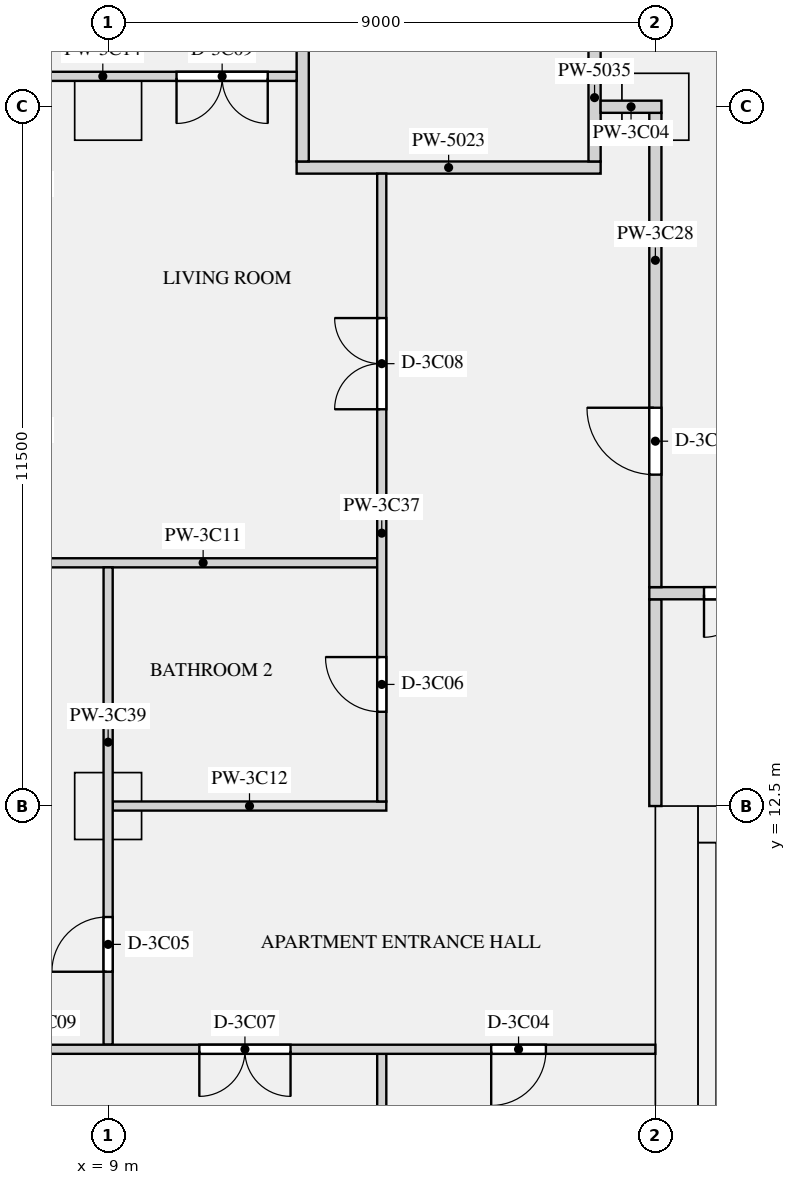
"""IFC4 building model, lengths in metres.
Left out: names, types, materials, properties, quantities, classifications, styles, units other than length and angle.
Written with IfcOpenShell. Run it as: python <this file> out.ifc"""

import sys

from ifc_helpers import new_model, si_unit, direction, frame, frame_2d, origin, origin_2d, place, context, subcontext, project, spatial, rectangle, extrude, element, fill, save


model = new_model("IFC4")
c1 = context("Model", 3, precision=1e-05, world=origin(), true_north=direction((0.0, 1.0)))
c2 = subcontext(c1, "Body", "Model", "MODEL_VIEW")
j1 = project(units=[si_unit("LENGTHUNIT", "METRE"), si_unit("PLANEANGLEUNIT", "RADIAN")], contexts=[c1])
p1 = place(None, origin())
s1 = spatial("IfcSite", under=j1, at=p1, CompositionType="ELEMENT")
p2 = place(p1, origin())
s2 = spatial("IfcBuilding", under=s1, at=p2, CompositionType="ELEMENT")
p3 = place(p2, frame((0.0, 0.0, 160.2)))
s3 = spatial("IfcBuildingStorey", under=s2, at=p3, CompositionType="ELEMENT", Elevation=160.2)
for number, where, z_axis, x_axis in (
    (1, (9.0, 24.0, 0.0), (0.0, 0.0, 1.0), (1.0, 0.0, 0.0)),
    (2, (18.0, 24.0, 0.0), (0.0, 0.0, 1.0), (1.0, 0.0, 0.0)),
    (3, (9.0, 12.5, 0.0), (0.0, 0.0, 1.0), (1.0, 0.0, 0.0)),
):
    element("IfcColumn", number, at=place(p3, frame(where, z_axis=z_axis, x_axis=x_axis)), inside=s3, PredefinedType="COLUMN", context=c2, shape_type="SweptSolid", body=[
        extrude(rectangle(XDim=1.1, YDim=1.1, at=origin_2d()), origin(), (0.0, 0.0, 1.0), 3.15),
    ])
p4 = place(p3, frame((18.35, 0.0, 0.0), z_axis=(0.0, 0.0, 1.0), x_axis=(0.0, 1.0, 0.0)))
e4 = element("IfcWall", 4, at=p4, inside=s3, PredefinedType="SHEAR", context=c2, shape_type="SweptSolid", body=[
    extrude(rectangle(XDim=12.5, YDim=0.7, at=frame_2d((6.25, 0.0))), origin(), (0.0, 0.0, 1.0), 3.15),
])
p5 = place(p3, frame((18.7, 12.2, 0.0), z_axis=(0.0, 0.0, 1.0), x_axis=(1.0, 0.0, 0.0)))
e5 = element("IfcWall", 5, at=p5, inside=s3, PredefinedType="SHEAR", context=c2, shape_type="SweptSolid", body=[
    extrude(rectangle(XDim=34.6, YDim=0.6, at=frame_2d((17.3, 0.0))), origin(), (0.0, 0.0, 1.0), 3.15),
])
p6 = place(p5, frame((24.475, 0.0, 0.0)))
e6 = element("IfcOpeningElement", 6, at=p6, cuts=e5, PredefinedType="OPENING", context=c2, shape_type="SweptSolid", body=[
    extrude(rectangle(XDim=1.1, YDim=2.1, at=frame_2d((0.55, 1.05))), frame((0.0, 0.31, 0.0), z_axis=(0.0, -1.0, 0.0), x_axis=(1.0, 0.0, 0.0)), (0.0, 0.0, 1.0), 0.62),
])
p7 = place(p5, frame((26.725, 0.0, 0.0)))
e7 = element("IfcOpeningElement", 7, at=p7, cuts=e5, PredefinedType="OPENING", context=c2, shape_type="SweptSolid", body=[
    extrude(rectangle(XDim=1.1, YDim=2.1, at=frame_2d((0.55, 1.05))), frame((0.0, 0.31, 0.0), z_axis=(0.0, -1.0, 0.0), x_axis=(1.0, 0.0, 0.0)), (0.0, 0.0, 1.0), 0.62),
])
p8 = place(p5, frame((28.975, 0.0, 0.0)))
e8 = element("IfcOpeningElement", 8, at=p8, cuts=e5, PredefinedType="OPENING", context=c2, shape_type="SweptSolid", body=[
    extrude(rectangle(XDim=1.1, YDim=2.1, at=frame_2d((0.55, 1.05))), frame((0.0, 0.31, 0.0), z_axis=(0.0, -1.0, 0.0), x_axis=(1.0, 0.0, 0.0)), (0.0, 0.0, 1.0), 0.62),
])
p9 = place(p5, frame((4.85, 0.0, 0.0)))
e9 = element("IfcOpeningElement", 9, at=p9, cuts=e5, PredefinedType="OPENING", context=c2, shape_type="SweptSolid", body=[
    extrude(rectangle(XDim=0.9, YDim=2.1, at=frame_2d((0.45, 1.05))), frame((0.0, 0.31, 0.0), z_axis=(0.0, -1.0, 0.0), x_axis=(1.0, 0.0, 0.0)), (0.0, 0.0, 1.0), 0.62),
])
p10 = place(p5, frame((13.85, 0.0, 0.0)))
e10 = element("IfcOpeningElement", 10, at=p10, cuts=e5, PredefinedType="OPENING", context=c2, shape_type="SweptSolid", body=[
    extrude(rectangle(XDim=0.9, YDim=2.1, at=frame_2d((0.45, 1.05))), frame((0.0, 0.31, 0.0), z_axis=(0.0, -1.0, 0.0), x_axis=(1.0, 0.0, 0.0)), (0.0, 0.0, 1.0), 0.62),
])
p11 = place(p5, frame((18.35, 0.0, 0.0)))
e11 = element("IfcOpeningElement", 11, at=p11, cuts=e5, PredefinedType="OPENING", context=c2, shape_type="SweptSolid", body=[
    extrude(rectangle(XDim=0.9, YDim=2.1, at=frame_2d((0.45, 1.05))), frame((0.0, 0.31, 0.0), z_axis=(0.0, -1.0, 0.0), x_axis=(1.0, 0.0, 0.0)), (0.0, 0.0, 1.0), 0.62),
])
p12 = place(p5, frame((1.45, 0.0, 0.0)))
e12 = element("IfcOpeningElement", 12, at=p12, cuts=e5, PredefinedType="OPENING", context=c2, shape_type="SweptSolid", body=[
    extrude(rectangle(XDim=1.2, YDim=2.1, at=frame_2d((0.6, 1.05))), frame((0.0, 0.31, 0.0), z_axis=(0.0, -1.0, 0.0), x_axis=(1.0, 0.0, 0.0)), (0.0, 0.0, 1.0), 0.62),
])
p13 = place(p5, frame((31.95, 0.0, 0.0)))
e13 = element("IfcOpeningElement", 13, at=p13, cuts=e5, PredefinedType="OPENING", context=c2, shape_type="SweptSolid", body=[
    extrude(rectangle(XDim=1.2, YDim=2.1, at=frame_2d((0.6, 1.05))), frame((0.0, 0.31, 0.0), z_axis=(0.0, -1.0, 0.0), x_axis=(1.0, 0.0, 0.0)), (0.0, 0.0, 1.0), 0.62),
])
p14 = place(p3, frame((18.85, 1.0, 0.0), z_axis=(0.0, 0.0, 1.0), x_axis=(0.0, 1.0, 0.0)))
e14 = element("IfcWall", 14, at=p14, inside=s3, PredefinedType="SHEAR", context=c2, shape_type="SweptSolid", body=[
    extrude(rectangle(XDim=10.9, YDim=0.3, at=frame_2d((5.45, 0.0))), origin(), (0.0, 0.0, 1.0), 3.15),
])
p15 = place(p3, frame((12.1, 23.0, 0.0), z_axis=(0.0, 0.0, 1.0), x_axis=(1.0, 0.0, 0.0)))
e15 = element("IfcWall", 15, at=p15, inside=s3, PredefinedType="PARTITIONING", context=c2, shape_type="SweptSolid", body=[
    extrude(rectangle(XDim=5.0, YDim=0.2, at=frame_2d((2.5, 0.0))), origin(), (0.0, 0.0, 1.0), 2.83),
])
p16 = place(p3, frame((18.0, 12.5, 0.0), z_axis=(0.0, 0.0, 1.0), x_axis=(0.0, 1.0, 0.0)))
e16 = element("IfcWall", 16, at=p16, inside=s3, PredefinedType="PARTITIONING", context=c2, shape_type="SweptSolid", body=[
    extrude(rectangle(XDim=3.4, YDim=0.2, at=frame_2d((1.7, 0.0))), origin(), (0.0, 0.0, 1.0), 2.83),
])
p17 = place(p3, frame((12.2, 23.1, 0.0), z_axis=(0.0, 0.0, 1.0), x_axis=(0.0, 1.0, 0.0)))
e17 = element("IfcWall", 17, at=p17, inside=s3, PredefinedType="PARTITIONING", context=c2, shape_type="SweptSolid", body=[
    extrude(rectangle(XDim=3.9, YDim=0.2, at=frame_2d((1.95, 0.0))), origin(), (0.0, 0.0, 1.0), 2.83),
])
p18 = place(p3, frame((17.0, 23.1, 0.0), z_axis=(0.0, 0.0, 1.0), x_axis=(0.0, 1.0, 0.0)))
e18 = element("IfcWall", 18, at=p18, inside=s3, PredefinedType="PARTITIONING", context=c2, shape_type="SweptSolid", body=[
    extrude(rectangle(XDim=3.8, YDim=0.2, at=frame_2d((1.9, 0.0))), origin(), (0.0, 0.0, 1.0), 2.83),
])
p19 = place(p18, frame((2.1, 0.0, 0.0)))
e19 = element("IfcOpeningElement", 19, at=p19, cuts=e18, PredefinedType="OPENING", context=c2, shape_type="SweptSolid", body=[
    extrude(rectangle(XDim=1.2, YDim=2.1, at=frame_2d((0.6, 1.05))), frame((0.0, 0.11, 0.0), z_axis=(0.0, -1.0, 0.0), x_axis=(1.0, 0.0, 0.0)), (0.0, 0.0, 1.0), 0.22),
])
p20 = place(p3, frame((17.1, 24.0, 0.0), z_axis=(0.0, 0.0, 1.0), x_axis=(1.0, 0.0, 0.0)))
e20 = element("IfcWall", 20, at=p20, inside=s3, PredefinedType="PARTITIONING", context=c2, shape_type="SweptSolid", body=[
    extrude(rectangle(XDim=1.0, YDim=0.2, at=frame_2d((0.5, 0.0))), origin(), (0.0, 0.0, 1.0), 2.83),
])
p21 = place(p3, frame((5.2, 8.5, 0.0), z_axis=(0.0, 0.0, 1.0), x_axis=(1.0, 0.0, 0.0)))
e21 = element("IfcWall", 21, at=p21, inside=s3, PredefinedType="PARTITIONING", context=c2, shape_type="SweptSolid", body=[
    extrude(rectangle(XDim=12.8, YDim=0.15, at=frame_2d((6.4, 0.0))), origin(), (0.0, 0.0, 1.0), 2.83),
])
p22 = place(p21, frame((10.1, 0.0, 0.0)))
e22 = element("IfcOpeningElement", 22, at=p22, cuts=e21, PredefinedType="OPENING", context=c2, shape_type="SweptSolid", body=[
    extrude(rectangle(XDim=0.9, YDim=2.1, at=frame_2d((0.45, 1.05))), frame((0.0, 0.085, 0.0), z_axis=(0.0, -1.0, 0.0), x_axis=(1.0, 0.0, 0.0)), (0.0, 0.0, 1.0), 0.17),
])
p23 = place(p21, frame((5.3, 0.0, 0.0)))
e23 = element("IfcOpeningElement", 23, at=p23, cuts=e21, PredefinedType="OPENING", context=c2, shape_type="SweptSolid", body=[
    extrude(rectangle(XDim=1.5, YDim=2.1, at=frame_2d((0.75, 1.05))), frame((0.0, 0.085, 0.0), z_axis=(0.0, -1.0, 0.0), x_axis=(1.0, 0.0, 0.0)), (0.0, 0.0, 1.0), 0.17),
])
p24 = place(p3, frame((7.7, 16.5, 0.0), z_axis=(0.0, 0.0, 1.0), x_axis=(1.0, 0.0, 0.0)))
e24 = element("IfcWall", 24, at=p24, inside=s3, PredefinedType="PARTITIONING", context=c2, shape_type="SweptSolid", body=[
    extrude(rectangle(XDim=5.725, YDim=0.15, at=frame_2d((2.863, 0.0))), origin(), (0.0, 0.0, 1.0), 2.83),
])
p25 = place(p3, frame((9.075, 12.5, 0.0), z_axis=(0.0, 0.0, 1.0), x_axis=(1.0, 0.0, 0.0)))
e25 = element("IfcWall", 25, at=p25, inside=s3, PredefinedType="PARTITIONING", context=c2, shape_type="SweptSolid", body=[
    extrude(rectangle(XDim=4.5, YDim=0.15, at=frame_2d((2.25, 0.0))), origin(), (0.0, 0.0, 1.0), 2.83),
])
p26 = place(p3, frame((7.7, 24.5, 0.0), z_axis=(0.0, 0.0, 1.0), x_axis=(1.0, 0.0, 0.0)))
e26 = element("IfcWall", 26, at=p26, inside=s3, PredefinedType="PARTITIONING", context=c2, shape_type="SweptSolid", body=[
    extrude(rectangle(XDim=4.4, YDim=0.15, at=frame_2d((2.2, 0.0))), origin(), (0.0, 0.0, 1.0), 2.83),
])
p27 = place(p26, frame((2.425, 0.0, 0.0)))
e27 = element("IfcOpeningElement", 27, at=p27, cuts=e26, PredefinedType="OPENING", context=c2, shape_type="SweptSolid", body=[
    extrude(rectangle(XDim=1.5, YDim=2.1, at=frame_2d((0.75, 1.05))), frame((0.0, 0.085, 0.0), z_axis=(0.0, -1.0, 0.0), x_axis=(1.0, 0.0, 0.0)), (0.0, 0.0, 1.0), 0.17),
])
p28 = place(p3, frame((17.9, 16.0, 0.0), z_axis=(0.0, 0.0, 1.0), x_axis=(1.0, 0.0, 0.0)))
e28 = element("IfcWall", 28, at=p28, inside=s3, PredefinedType="PARTITIONING", context=c2, shape_type="SweptSolid", body=[
    extrude(rectangle(XDim=36.2, YDim=0.2, at=frame_2d((18.1, 0.0))), origin(), (0.0, 0.0, 1.0), 2.83),
])
p29 = place(p28, frame((0.9, 0.0, 0.0)))
e29 = element("IfcOpeningElement", 29, at=p29, cuts=e28, PredefinedType="OPENING", context=c2, shape_type="SweptSolid", body=[
    extrude(rectangle(XDim=1.4, YDim=2.1, at=frame_2d((0.7, 1.05))), frame((0.0, 0.11, 0.0), z_axis=(0.0, -1.0, 0.0), x_axis=(1.0, 0.0, 0.0)), (0.0, 0.0, 1.0), 0.22),
])
p30 = place(p28, frame((33.9, 0.0, 0.0)))
e30 = element("IfcOpeningElement", 30, at=p30, cuts=e28, PredefinedType="OPENING", context=c2, shape_type="SweptSolid", body=[
    extrude(rectangle(XDim=1.4, YDim=2.1, at=frame_2d((0.7, 1.05))), frame((0.0, 0.11, 0.0), z_axis=(0.0, -1.0, 0.0), x_axis=(1.0, 0.0, 0.0)), (0.0, 0.0, 1.0), 0.22),
])
p31 = place(p3, frame((18.0, 16.1, 0.0), z_axis=(0.0, 0.0, 1.0), x_axis=(0.0, 1.0, 0.0)))
e31 = element("IfcWall", 31, at=p31, inside=s3, PredefinedType="PARTITIONING", context=c2, shape_type="SweptSolid", body=[
    extrude(rectangle(XDim=7.8, YDim=0.2, at=frame_2d((3.9, 0.0))), origin(), (0.0, 0.0, 1.0), 2.83),
])
p32 = place(p31, frame((1.85, 0.0, 0.0)))
e32 = element("IfcOpeningElement", 32, at=p32, cuts=e31, PredefinedType="OPENING", context=c2, shape_type="SweptSolid", body=[
    extrude(rectangle(XDim=1.1, YDim=2.1, at=frame_2d((0.55, 1.05))), frame((0.0, 0.11, 0.0), z_axis=(0.0, -1.0, 0.0), x_axis=(1.0, 0.0, 0.0)), (0.0, 0.0, 1.0), 0.22),
])
p33 = place(p3, frame((13.5, 0.7, 0.0), z_axis=(0.0, 0.0, 1.0), x_axis=(0.0, 1.0, 0.0)))
e33 = element("IfcWall", 33, at=p33, inside=s3, PredefinedType="PARTITIONING", context=c2, shape_type="SweptSolid", body=[
    extrude(rectangle(XDim=7.725, YDim=0.15, at=frame_2d((3.863, 0.0))), origin(), (0.0, 0.0, 1.0), 2.83),
])
p34 = place(p3, frame((13.5, 12.575, 0.0), z_axis=(0.0, 0.0, 1.0), x_axis=(0.0, 1.0, 0.0)))
e34 = element("IfcWall", 34, at=p34, inside=s3, PredefinedType="PARTITIONING", context=c2, shape_type="SweptSolid", body=[
    extrude(rectangle(XDim=10.325, YDim=0.15, at=frame_2d((5.163, 0.0))), origin(), (0.0, 0.0, 1.0), 2.83),
])
p35 = place(p34, frame((1.475, 0.0, 0.0)))
e35 = element("IfcOpeningElement", 35, at=p35, cuts=e34, PredefinedType="OPENING", context=c2, shape_type="SweptSolid", body=[
    extrude(rectangle(XDim=0.9, YDim=2.1, at=frame_2d((0.45, 1.05))), frame((0.0, 0.085, 0.0), z_axis=(0.0, -1.0, 0.0), x_axis=(1.0, 0.0, 0.0)), (0.0, 0.0, 1.0), 0.17),
])
p36 = place(p34, frame((6.45, 0.0, 0.0)))
e36 = element("IfcOpeningElement", 36, at=p36, cuts=e34, PredefinedType="OPENING", context=c2, shape_type="SweptSolid", body=[
    extrude(rectangle(XDim=1.5, YDim=2.1, at=frame_2d((0.75, 1.05))), frame((0.0, 0.085, 0.0), z_axis=(0.0, -1.0, 0.0), x_axis=(1.0, 0.0, 0.0)), (0.0, 0.0, 1.0), 0.17),
])
p37 = place(p3, frame((9.0, 8.575, 0.0), z_axis=(0.0, 0.0, 1.0), x_axis=(0.0, 1.0, 0.0)))
e37 = element("IfcWall", 37, at=p37, inside=s3, PredefinedType="PARTITIONING", context=c2, shape_type="SweptSolid", body=[
    extrude(rectangle(XDim=7.85, YDim=0.15, at=frame_2d((3.925, 0.0))), origin(), (0.0, 0.0, 1.0), 2.83),
])
p38 = place(p37, frame((1.2, 0.0, 0.0)))
e38 = element("IfcOpeningElement", 38, at=p38, cuts=e37, PredefinedType="OPENING", context=c2, shape_type="SweptSolid", body=[
    extrude(rectangle(XDim=0.9, YDim=2.1, at=frame_2d((0.45, 1.05))), frame((0.0, 0.085, 0.0), z_axis=(0.0, -1.0, 0.0), x_axis=(1.0, 0.0, 0.0)), (0.0, 0.0, 1.0), 0.17),
])
p39 = place(p29, frame((1.4, 0.0, 0.0), z_axis=(0.0, 0.0, 1.0), x_axis=(-1.0, 0.0, 0.0)))
e39 = element("IfcDoor", 39, at=p39, inside=s3, OperationType="DOUBLE_DOOR_SINGLE_SWING", PredefinedType="DOOR", context=c2, shape_type="SweptSolid", body=[
    extrude(rectangle(XDim=1.4, YDim=2.1, at=frame_2d((0.7, 1.05))), frame((0.0, 0.025, 0.0), z_axis=(0.0, -1.0, 0.0), x_axis=(1.0, 0.0, 0.0)), (0.0, 0.0, 1.0), 0.05),
])
fill(e29, e39)
p40 = place(p32, origin())
e40 = element("IfcDoor", 40, at=p40, inside=s3, OperationType="SINGLE_SWING_RIGHT", PredefinedType="DOOR", context=c2, shape_type="SweptSolid", body=[
    extrude(rectangle(XDim=1.1, YDim=2.1, at=frame_2d((0.55, 1.05))), frame((0.0, 0.025, 0.0), z_axis=(0.0, -1.0, 0.0), x_axis=(1.0, 0.0, 0.0)), (0.0, 0.0, 1.0), 0.05),
])
fill(e32, e40)
p41 = place(p22, frame((0.9, 0.0, 0.0), z_axis=(0.0, 0.0, 1.0), x_axis=(-1.0, 0.0, 0.0)))
e41 = element("IfcDoor", 41, at=p41, inside=s3, OperationType="SINGLE_SWING_RIGHT", PredefinedType="DOOR", context=c2, shape_type="SweptSolid", body=[
    extrude(rectangle(XDim=0.9, YDim=2.1, at=frame_2d((0.45, 1.05))), frame((0.0, 0.025, 0.0), z_axis=(0.0, -1.0, 0.0), x_axis=(1.0, 0.0, 0.0)), (0.0, 0.0, 1.0), 0.05),
])
fill(e22, e41)
p42 = place(p38, origin())
e42 = element("IfcDoor", 42, at=p42, inside=s3, OperationType="SINGLE_SWING_LEFT", PredefinedType="DOOR", context=c2, shape_type="SweptSolid", body=[
    extrude(rectangle(XDim=0.9, YDim=2.1, at=frame_2d((0.45, 1.05))), frame((0.0, 0.025, 0.0), z_axis=(0.0, -1.0, 0.0), x_axis=(1.0, 0.0, 0.0)), (0.0, 0.0, 1.0), 0.05),
])
fill(e38, e42)
p43 = place(p35, origin())
e43 = element("IfcDoor", 43, at=p43, inside=s3, OperationType="SINGLE_SWING_RIGHT", PredefinedType="DOOR", context=c2, shape_type="SweptSolid", body=[
    extrude(rectangle(XDim=0.9, YDim=2.1, at=frame_2d((0.45, 1.05))), frame((0.0, 0.025, 0.0), z_axis=(0.0, -1.0, 0.0), x_axis=(1.0, 0.0, 0.0)), (0.0, 0.0, 1.0), 0.05),
])
fill(e35, e43)
p44 = place(p23, frame((1.5, 0.0, 0.0), z_axis=(0.0, 0.0, 1.0), x_axis=(-1.0, 0.0, 0.0)))
e44 = element("IfcDoor", 44, at=p44, inside=s3, OperationType="DOUBLE_DOOR_SINGLE_SWING", PredefinedType="DOOR", context=c2, shape_type="SweptSolid", body=[
    extrude(rectangle(XDim=1.5, YDim=2.1, at=frame_2d((0.75, 1.05))), frame((0.0, 0.025, 0.0), z_axis=(0.0, -1.0, 0.0), x_axis=(1.0, 0.0, 0.0)), (0.0, 0.0, 1.0), 0.05),
])
fill(e23, e44)
p45 = place(p36, origin())
e45 = element("IfcDoor", 45, at=p45, inside=s3, OperationType="DOUBLE_DOOR_SINGLE_SWING", PredefinedType="DOOR", context=c2, shape_type="SweptSolid", body=[
    extrude(rectangle(XDim=1.5, YDim=2.1, at=frame_2d((0.75, 1.05))), frame((0.0, 0.025, 0.0), z_axis=(0.0, -1.0, 0.0), x_axis=(1.0, 0.0, 0.0)), (0.0, 0.0, 1.0), 0.05),
])
fill(e36, e45)
p46 = place(p27, frame((1.5, 0.0, 0.0), z_axis=(0.0, 0.0, 1.0), x_axis=(-1.0, 0.0, 0.0)))
e46 = element("IfcDoor", 46, at=p46, inside=s3, OperationType="DOUBLE_DOOR_SINGLE_SWING", PredefinedType="DOOR", context=c2, shape_type="SweptSolid", body=[
    extrude(rectangle(XDim=1.5, YDim=2.1, at=frame_2d((0.75, 1.05))), frame((0.0, 0.025, 0.0), z_axis=(0.0, -1.0, 0.0), x_axis=(1.0, 0.0, 0.0)), (0.0, 0.0, 1.0), 0.05),
])
fill(e27, e46)
save(model, sys.argv[1])
